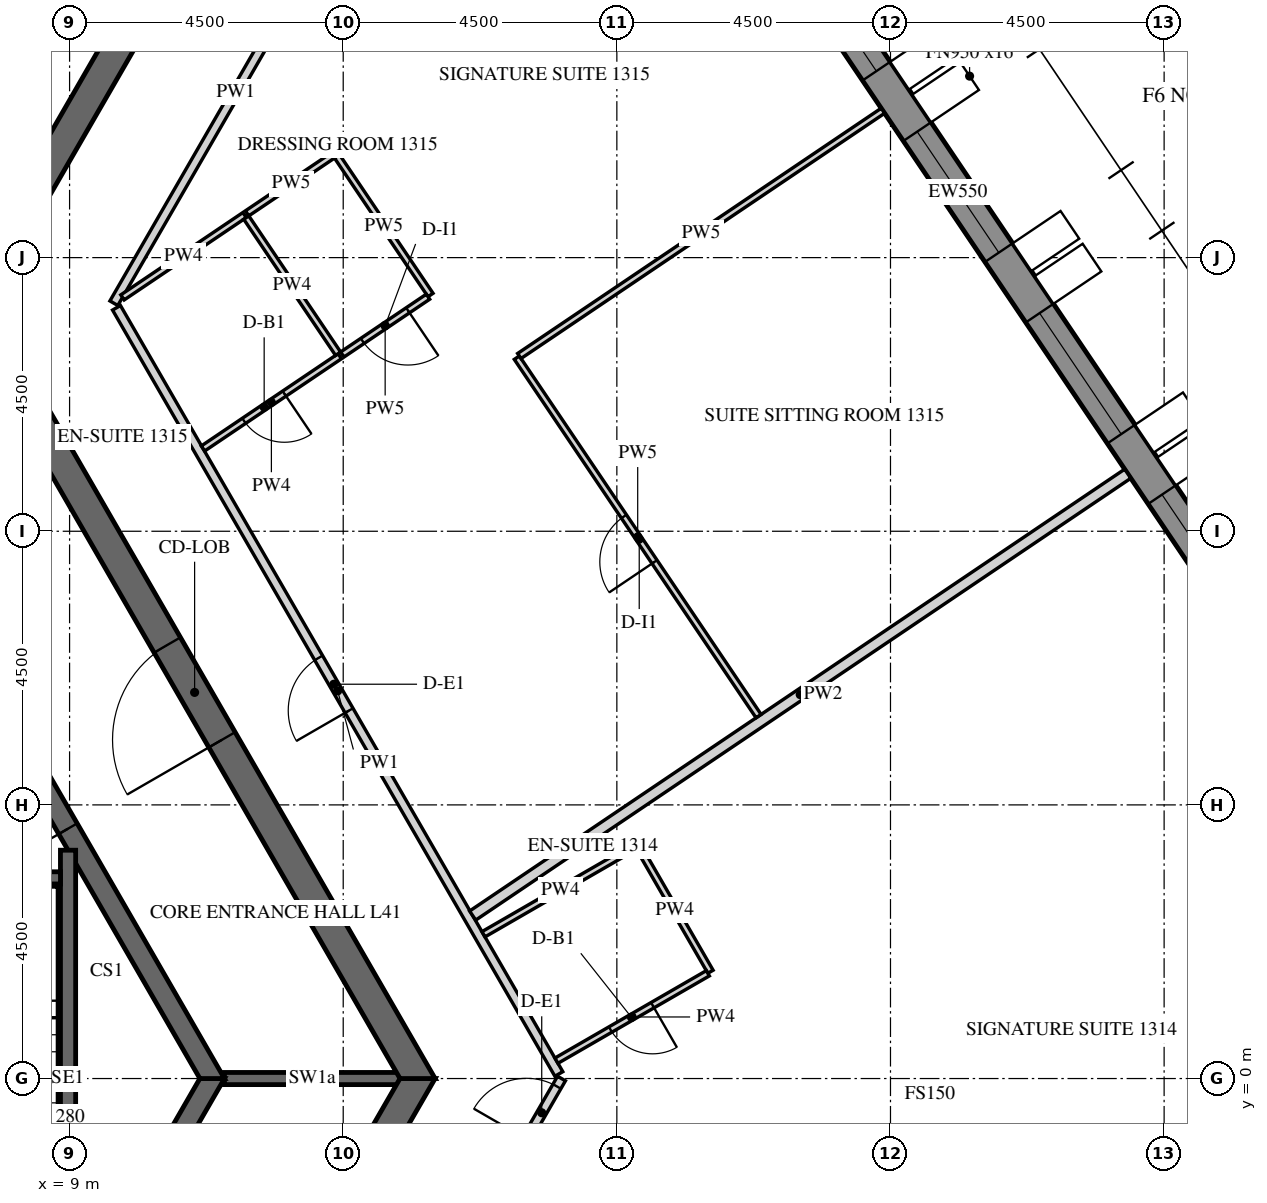
"""IFC4 building model, lengths in metres.
Left out: names, types, materials, properties, quantities, classifications, styles, units other than length and angle.
Written with IfcOpenShell. Run it as: python <this file> out.ifc"""

import sys

from ifc_helpers import new_model, si_unit, direction, frame, frame_2d, origin, place, context, subcontext, project, spatial, polyline, rectangle, outline, extrude, element, fill, save


model = new_model("IFC4")
c1 = context("Model", 3, precision=1e-05, world=origin(), true_north=direction((0.0, 1.0)))
c2 = subcontext(c1, "Body", "Model", "MODEL_VIEW")
j1 = project(units=[si_unit("LENGTHUNIT", "METRE"), si_unit("PLANEANGLEUNIT", "RADIAN")], contexts=[c1])
p1 = place(None, origin())
s1 = spatial("IfcSite", under=j1, at=p1, CompositionType="ELEMENT")
p2 = place(p1, origin())
s2 = spatial("IfcBuilding", under=s1, at=p2, CompositionType="ELEMENT")
p3 = place(p2, frame((0.0, 0.0, 176.1)))
s3 = spatial("IfcBuildingStorey", under=s2, at=p3, CompositionType="ELEMENT", Elevation=176.1)
p4 = place(p3, frame((31.371, 3.071, -0.15), z_axis=(0.0, 0.0, 1.0), x_axis=(-0.559189891278, 0.829039604297, 0.0)))
e1 = element("IfcWall", 1, at=p4, inside=s3, PredefinedType="SOLIDWALL", context=c2, shape_type="SweptSolid", body=[
    extrude(outline(polyline([(-0.026, -0.275), (27.781, -0.275), (27.736, 0.275), (0.026, 0.275), (-0.026, -0.275)])), origin(), (0.0, 0.0, 1.0), 3.9),
])
p5 = place(p4, frame((1.879, 0.0, 1.05)))
e2 = element("IfcOpeningElement", 2, at=p5, cuts=e1, PredefinedType="OPENING", context=c2, shape_type="SweptSolid", body=[
    extrude(rectangle(XDim=2.4, YDim=2.4, at=frame_2d((1.2, 1.2))), frame((0.0, 0.285, 0.0), z_axis=(0.0, -1.0, 0.0), x_axis=(1.0, 0.0, 0.0)), (0.0, 0.0, 1.0), 0.57),
])
p6 = place(p4, frame((5.479, 0.0, 1.05)))
e3 = element("IfcOpeningElement", 3, at=p6, cuts=e1, PredefinedType="OPENING", context=c2, shape_type="SweptSolid", body=[
    extrude(rectangle(XDim=2.4, YDim=2.4, at=frame_2d((1.2, 1.2))), frame((0.0, 0.285, 0.0), z_axis=(0.0, -1.0, 0.0), x_axis=(1.0, 0.0, 0.0)), (0.0, 0.0, 1.0), 0.57),
])
p7 = place(p4, frame((9.079, 0.0, 1.05)))
e4 = element("IfcOpeningElement", 4, at=p7, cuts=e1, PredefinedType="OPENING", context=c2, shape_type="SweptSolid", body=[
    extrude(rectangle(XDim=2.4, YDim=2.4, at=frame_2d((1.2, 1.2))), frame((0.0, 0.285, 0.0), z_axis=(0.0, -1.0, 0.0), x_axis=(1.0, 0.0, 0.0)), (0.0, 0.0, 1.0), 0.57),
])
p8 = place(p4, frame((12.679, 0.0, 1.05)))
e5 = element("IfcOpeningElement", 5, at=p8, cuts=e1, PredefinedType="OPENING", context=c2, shape_type="SweptSolid", body=[
    extrude(rectangle(XDim=2.4, YDim=2.4, at=frame_2d((1.2, 1.2))), frame((0.0, 0.285, 0.0), z_axis=(0.0, -1.0, 0.0), x_axis=(1.0, 0.0, 0.0)), (0.0, 0.0, 1.0), 0.57),
])
p9 = place(p4, frame((16.279, 0.0, 1.05)))
e6 = element("IfcOpeningElement", 6, at=p9, cuts=e1, PredefinedType="OPENING", context=c2, shape_type="SweptSolid", body=[
    extrude(rectangle(XDim=2.4, YDim=2.4, at=frame_2d((1.2, 1.2))), frame((0.0, 0.285, 0.0), z_axis=(0.0, -1.0, 0.0), x_axis=(1.0, 0.0, 0.0)), (0.0, 0.0, 1.0), 0.57),
])
p10 = place(p4, frame((19.879, 0.0, 1.05)))
e7 = element("IfcOpeningElement", 7, at=p10, cuts=e1, PredefinedType="OPENING", context=c2, shape_type="SweptSolid", body=[
    extrude(rectangle(XDim=2.4, YDim=2.4, at=frame_2d((1.2, 1.2))), frame((0.0, 0.285, 0.0), z_axis=(0.0, -1.0, 0.0), x_axis=(1.0, 0.0, 0.0)), (0.0, 0.0, 1.0), 0.57),
])
p11 = place(p4, frame((23.479, 0.0, 1.05)))
e8 = element("IfcOpeningElement", 8, at=p11, cuts=e1, PredefinedType="OPENING", context=c2, shape_type="SweptSolid", body=[
    extrude(rectangle(XDim=2.4, YDim=2.4, at=frame_2d((1.2, 1.2))), frame((0.0, 0.285, 0.0), z_axis=(0.0, -1.0, 0.0), x_axis=(1.0, 0.0, 0.0)), (0.0, 0.0, 1.0), 0.57),
])
p12 = place(p3, frame((7.361, -12.75, -0.15), z_axis=(0.0, 0.0, 1.0), x_axis=(0.50000571537, 0.866022103989, 0.0)))
e9 = element("IfcWall", 9, at=p12, inside=s3, PredefinedType="SHEAR", context=c2, shape_type="SweptSolid", body=[
    extrude(outline(polyline([(-0.144, -0.25), (14.867, -0.25), (14.578, 0.25), (0.144, 0.25), (-0.144, -0.25)])), origin(), (0.0, 0.0, 1.0), 3.9),
])
p13 = place(p12, frame((6.49, 0.0, 0.15)))
e10 = element("IfcOpeningElement", 10, at=p13, cuts=e9, PredefinedType="OPENING", context=c2, shape_type="SweptSolid", body=[
    extrude(rectangle(XDim=1.8, YDim=2.4, at=frame_2d((0.9, 1.2))), frame((0.0, 0.26, 0.0), z_axis=(0.0, -1.0, 0.0), x_axis=(1.0, 0.0, 0.0)), (0.0, 0.0, 1.0), 0.52),
])
p14 = place(p3, frame((14.722, 0.0, -0.15), z_axis=(0.0, 0.0, 1.0), x_axis=(-0.50000571537, 0.866022103989, 0.0)))
e11 = element("IfcWall", 11, at=p14, inside=s3, PredefinedType="SHEAR", context=c2, shape_type="SweptSolid", body=[
    extrude(outline(polyline([(-0.144, -0.25), (14.867, -0.25), (14.578, 0.25), (0.144, 0.25), (-0.144, -0.25)])), origin(), (0.0, 0.0, 1.0), 3.9),
])
p15 = place(p14, frame((6.432, 0.0, 0.15)))
e12 = element("IfcOpeningElement", 12, at=p15, cuts=e11, PredefinedType="OPENING", context=c2, shape_type="SweptSolid", body=[
    extrude(rectangle(XDim=1.8, YDim=2.4, at=frame_2d((0.9, 1.2))), frame((0.0, 0.26, 0.0), z_axis=(0.0, -1.0, 0.0), x_axis=(1.0, 0.0, 0.0)), (0.0, 0.0, 1.0), 0.52),
])
p16 = place(p3, frame((7.506, 13.0, -0.15), z_axis=(0.0, 0.0, 1.0), x_axis=(0.499988271576, 0.866032175087, 0.0)))
e13 = element("IfcWall", 13, at=p16, inside=s3, PredefinedType="SHEAR", context=c2, shape_type="SweptSolid", body=[
    extrude(rectangle(XDim=15.424, YDim=0.5, at=frame_2d((7.712, 0.0))), origin(), (0.0, 0.0, 1.0), 3.9),
])
p17 = place(p16, frame((6.812, 0.0, 0.15)))
e14 = element("IfcOpeningElement", 14, at=p17, cuts=e13, PredefinedType="OPENING", context=c2, shape_type="SweptSolid", body=[
    extrude(rectangle(XDim=1.8, YDim=2.4, at=frame_2d((0.9, 1.2))), frame((0.0, 0.26, 0.0), z_axis=(0.0, -1.0, 0.0), x_axis=(1.0, 0.0, 0.0)), (0.0, 0.0, 1.0), 0.52),
])
p18 = place(p3, frame((5.673, -9.825, -0.15), z_axis=(0.0, 0.0, 1.0), x_axis=(0.499995046907, 0.866028263435, 0.0)))
e15 = element("IfcWall", 15, at=p18, inside=s3, PredefinedType="SHEAR", context=c2, shape_type="SweptSolid", body=[
    extrude(outline(polyline([(-0.101, -0.175), (11.446, -0.175), (11.244, 0.175), (0.101, 0.175), (-0.101, -0.175)])), origin(), (0.0, 0.0, 1.0), 3.9),
])
p19 = place(p18, frame((4.801, 0.0, 0.15)))
e16 = element("IfcOpeningElement", 16, at=p19, cuts=e15, PredefinedType="OPENING", context=c2, shape_type="SweptSolid", body=[
    extrude(rectangle(XDim=1.8, YDim=2.4, at=frame_2d((0.9, 1.2))), frame((0.0, 0.185, 0.0), z_axis=(0.0, -1.0, 0.0), x_axis=(1.0, 0.0, 0.0)), (0.0, 0.0, 1.0), 0.37),
])
p20 = place(p3, frame((11.345, 0.0, -0.15), z_axis=(0.0, 0.0, 1.0), x_axis=(-0.499995046907, 0.866028263435, 0.0)))
e17 = element("IfcWall", 17, at=p20, inside=s3, PredefinedType="SHEAR", context=c2, shape_type="SweptSolid", body=[
    extrude(outline(polyline([(-0.101, -0.175), (11.446, -0.175), (11.244, 0.175), (0.101, 0.175), (-0.101, -0.175)])), origin(), (0.0, 0.0, 1.0), 3.9),
])
p21 = place(p20, frame((4.744, 0.0, 0.15)))
e18 = element("IfcOpeningElement", 18, at=p21, cuts=e17, PredefinedType="OPENING", context=c2, shape_type="SweptSolid", body=[
    extrude(rectangle(XDim=1.8, YDim=2.4, at=frame_2d((0.9, 1.2))), frame((0.0, 0.185, 0.0), z_axis=(0.0, -1.0, 0.0), x_axis=(1.0, 0.0, 0.0)), (0.0, 0.0, 1.0), 0.37),
])
p22 = place(p3, frame((11.547, 0.0, -0.15), z_axis=(0.0, 0.0, 1.0), x_axis=(1.0, 0.0, 0.0)))
e19 = element("IfcWall", 19, at=p22, inside=s3, PredefinedType="SHEAR", context=c2, shape_type="SweptSolid", body=[
    extrude(rectangle(XDim=2.887, YDim=0.2, at=frame_2d((1.443, 0.0))), origin(), (0.0, 0.0, 1.0), 3.9),
])
p23 = place(p3, frame((8.975, -3.755, -0.25), z_axis=(0.0, 0.0, 1.0), x_axis=(0.0, 1.0, 0.0)))
e20 = element("IfcWall", 20, at=p23, inside=s3, PredefinedType="SHEAR", context=c2, shape_type="SweptSolid", body=[
    extrude(rectangle(XDim=7.51, YDim=0.25, at=frame_2d((3.755, 0.0))), origin(), (0.0, 0.0, 1.0), 3.9),
])
p24 = place(p3, frame((5.9, 3.3, -0.25), z_axis=(0.0, 0.0, 1.0), x_axis=(1.0, 0.0, 0.0)))
e21 = element("IfcWall", 21, at=p24, inside=s3, PredefinedType="SHEAR", context=c2, shape_type="SweptSolid", body=[
    extrude(rectangle(XDim=2.95, YDim=0.2, at=frame_2d((1.475, 0.0))), origin(), (0.0, 0.0, 1.0), 3.9),
])
p25 = place(p3, frame((10.149, 21.678, 0.0), z_axis=(0.0, 0.0, 1.0), x_axis=(-0.499997422768, -0.866026891745, 0.0)))
e22 = element("IfcWall", 22, at=p25, inside=s3, PredefinedType="PARTITIONING", context=c2, shape_type="SweptSolid", body=[
    extrude(rectangle(XDim=7.942, YDim=0.15, at=frame_2d((3.971, 0.0))), origin(), (0.0, 0.0, 1.0), 2.988),
])
p26 = place(p25, frame((4.733, 0.0, 0.0)))
e23 = element("IfcOpeningElement", 23, at=p26, cuts=e22, PredefinedType="OPENING", context=c2, shape_type="SweptSolid", body=[
    extrude(rectangle(XDim=1.0, YDim=2.1, at=frame_2d((0.5, 1.05))), frame((0.0, 0.085, 0.0), z_axis=(0.0, -1.0, 0.0), x_axis=(1.0, 0.0, 0.0)), (0.0, 0.0, 1.0), 0.17),
])
p27 = place(p3, frame((10.714, -11.043, 0.0), z_axis=(0.0, 0.0, 1.0), x_axis=(0.500001980452, 0.866024260367, 0.0)))
e24 = element("IfcWall", 24, at=p27, inside=s3, PredefinedType="PARTITIONING", context=c2, shape_type="SweptSolid", body=[
    extrude(rectangle(XDim=12.752, YDim=0.15, at=frame_2d((6.376, 0.0))), origin(), (0.0, 0.0, 1.0), 2.988),
])
p28 = place(p27, frame((6.125, 0.0, 0.0)))
e25 = element("IfcOpeningElement", 25, at=p28, cuts=e24, PredefinedType="OPENING", context=c2, shape_type="SweptSolid", body=[
    extrude(rectangle(XDim=1.0, YDim=2.1, at=frame_2d((0.5, 1.05))), frame((0.0, 0.085, 0.0), z_axis=(0.0, -1.0, 0.0), x_axis=(1.0, 0.0, 0.0)), (0.0, 0.0, 1.0), 0.17),
])
p29 = place(p27, frame((11.602, 0.0, 0.0)))
e26 = element("IfcOpeningElement", 26, at=p29, cuts=e24, PredefinedType="OPENING", context=c2, shape_type="SweptSolid", body=[
    extrude(rectangle(XDim=1.0, YDim=2.1, at=frame_2d((0.5, 1.05))), frame((0.0, 0.085, 0.0), z_axis=(0.0, -1.0, 0.0), x_axis=(1.0, 0.0, 0.0)), (0.0, 0.0, 1.0), 0.17),
])
p30 = place(p3, frame((17.046, 0.075, 0.0), z_axis=(0.0, 0.0, 1.0), x_axis=(-0.499999403554, 0.866025748143, 0.0)))
e27 = element("IfcWall", 27, at=p30, inside=s3, PredefinedType="PARTITIONING", context=c2, shape_type="SweptSolid", body=[
    extrude(rectangle(XDim=14.549, YDim=0.15, at=frame_2d((7.275, 0.0))), origin(), (0.0, 0.0, 1.0), 2.988),
])
p31 = place(p30, frame((6.901, 0.0, 0.0)))
e28 = element("IfcOpeningElement", 28, at=p31, cuts=e27, PredefinedType="OPENING", context=c2, shape_type="SweptSolid", body=[
    extrude(rectangle(XDim=1.0, YDim=2.1, at=frame_2d((0.5, 1.05))), frame((0.0, 0.085, 0.0), z_axis=(0.0, -1.0, 0.0), x_axis=(1.0, 0.0, 0.0)), (0.0, 0.0, 1.0), 0.17),
])
p32 = place(p3, frame((9.728, 12.75, 0.0), z_axis=(0.0, 0.0, 1.0), x_axis=(0.500007149838, 0.866021275784, 0.0)))
e29 = element("IfcWall", 29, at=p32, inside=s3, PredefinedType="PARTITIONING", context=c2, shape_type="SweptSolid", body=[
    extrude(rectangle(XDim=8.017, YDim=0.15, at=frame_2d((4.009, 0.0))), origin(), (0.0, 0.0, 1.0), 2.988),
])
p33 = place(p3, frame((15.807, 2.372, 0.0), z_axis=(0.0, 0.0, 1.0), x_axis=(0.86601045545, 0.500025890382, 0.0)))
e30 = element("IfcWall", 30, at=p33, inside=s3, PredefinedType="PARTITIONING", context=c2, shape_type="SweptSolid", body=[
    extrude(rectangle(XDim=2.925, YDim=0.1, at=frame_2d((1.462, 0.0))), origin(), (0.0, 0.0, 1.0), 2.988),
])
p34 = place(p3, frame((18.365, 3.791, 0.0), z_axis=(0.0, 0.0, 1.0), x_axis=(0.500016218704, -0.866016039709, 0.0)))
e31 = element("IfcWall", 31, at=p34, inside=s3, PredefinedType="PARTITIONING", context=c2, shape_type="SweptSolid", body=[
    extrude(rectangle(XDim=2.35, YDim=0.1, at=frame_2d((1.175, 0.0))), origin(), (0.0, 0.0, 1.0), 2.988),
])
p35 = place(p3, frame((19.496, 1.731, 0.0), z_axis=(0.0, 0.0, 1.0), x_axis=(-0.866018712932, -0.500011588718, 0.0)))
e32 = element("IfcWall", 32, at=p35, inside=s3, PredefinedType="PARTITIONING", context=c2, shape_type="SweptSolid", body=[
    extrude(rectangle(XDim=2.875, YDim=0.1, at=frame_2d((1.438, 0.0))), origin(), (0.0, 0.0, 1.0), 2.988),
])
p36 = place(p35, frame((1.05, 0.0, 0.0)))
e33 = element("IfcOpeningElement", 33, at=p36, cuts=e32, PredefinedType="OPENING", context=c2, shape_type="SweptSolid", body=[
    extrude(rectangle(XDim=0.8, YDim=2.1, at=frame_2d((0.4, 1.05))), frame((0.0, 0.06, 0.0), z_axis=(0.0, -1.0, 0.0), x_axis=(1.0, 0.0, 0.0)), (0.0, 0.0, 1.0), 0.12),
])
p37 = place(p3, frame((26.402, 9.946, 0.0), z_axis=(0.0, 0.0, 1.0), x_axis=(-0.829032022697, -0.559201131386, 0.0)))
e34 = element("IfcWall", 34, at=p37, inside=s3, PredefinedType="PARTITIONING", context=c2, shape_type="SweptSolid", body=[
    extrude(rectangle(XDim=12.995, YDim=0.18, at=frame_2d((6.497, 0.0))), origin(), (0.0, 0.0, 1.0), 2.988),
])
p38 = place(p3, frame((9.87, 12.846, 0.0), z_axis=(0.0, 0.0, 1.0), x_axis=(0.829044958406, 0.559181953341, 0.0)))
e35 = element("IfcWall", 35, at=p38, inside=s3, PredefinedType="PARTITIONING", context=c2, shape_type="SweptSolid", body=[
    extrude(rectangle(XDim=2.422, YDim=0.1, at=frame_2d((1.211, 0.0))), origin(), (0.0, 0.0, 1.0), 2.988),
])
p39 = place(p3, frame((13.444, 11.878, 0.0), z_axis=(0.0, 0.0, 1.0), x_axis=(-0.829076008986, -0.559135914894, 0.0)))
e36 = element("IfcWall", 36, at=p39, inside=s3, PredefinedType="PARTITIONING", context=c2, shape_type="SweptSolid", body=[
    extrude(rectangle(XDim=2.713, YDim=0.1, at=frame_2d((1.357, 0.0))), origin(), (0.0, 0.0, 1.0), 2.988),
])
p40 = place(p39, frame((1.1, 0.0, 0.0)))
e37 = element("IfcOpeningElement", 37, at=p40, cuts=e36, PredefinedType="OPENING", context=c2, shape_type="SweptSolid", body=[
    extrude(rectangle(XDim=0.8, YDim=2.1, at=frame_2d((0.4, 1.05))), frame((0.0, 0.06, 0.0), z_axis=(0.0, -1.0, 0.0), x_axis=(1.0, 0.0, 0.0)), (0.0, 0.0, 1.0), 0.12),
])
p41 = place(p3, frame((11.919, 14.228, 0.0), z_axis=(0.0, 0.0, 1.0), x_axis=(0.829076640662, 0.559134978256, 0.0)))
e38 = element("IfcWall", 38, at=p41, inside=s3, PredefinedType="PARTITIONING", context=c2, shape_type="SweptSolid", body=[
    extrude(rectangle(XDim=1.75, YDim=0.1, at=frame_2d((0.875, 0.0))), origin(), (0.0, 0.0, 1.0), 2.988),
])
p42 = place(p3, frame((13.398, 15.165, 0.0), z_axis=(0.0, 0.0, 1.0), x_axis=(0.559178562802, -0.829047245278, 0.0)))
e39 = element("IfcWall", 39, at=p42, inside=s3, PredefinedType="PARTITIONING", context=c2, shape_type="SweptSolid", body=[
    extrude(rectangle(XDim=2.75, YDim=0.1, at=frame_2d((1.375, 0.0))), origin(), (0.0, 0.0, 1.0), 2.988),
])
p43 = place(p3, frame((14.894, 12.857, 0.0), z_axis=(0.0, 0.0, 1.0), x_axis=(-0.828988508894, -0.559265636457, 0.0)))
e40 = element("IfcWall", 40, at=p43, inside=s3, PredefinedType="PARTITIONING", context=c2, shape_type="SweptSolid", body=[
    extrude(rectangle(XDim=1.7, YDim=0.1, at=frame_2d((0.85, 0.0))), origin(), (0.0, 0.0, 1.0), 2.988),
])
p44 = place(p43, frame((0.4, 0.0, 0.0)))
e41 = element("IfcOpeningElement", 41, at=p44, cuts=e40, PredefinedType="OPENING", context=c2, shape_type="SweptSolid", body=[
    extrude(rectangle(XDim=0.9, YDim=2.1, at=frame_2d((0.45, 1.05))), frame((0.0, 0.06, 0.0), z_axis=(0.0, -1.0, 0.0), x_axis=(1.0, 0.0, 0.0)), (0.0, 0.0, 1.0), 0.12),
])
p45 = place(p3, frame((20.331, 5.96, 0.0), z_axis=(0.0, 0.0, 1.0), x_axis=(-0.559185029686, 0.829042883435, 0.0)))
e42 = element("IfcWall", 42, at=p45, inside=s3, PredefinedType="PARTITIONING", context=c2, shape_type="SweptSolid", body=[
    extrude(rectangle(XDim=7.11, YDim=0.1, at=frame_2d((3.555, 0.0))), origin(), (0.0, 0.0, 1.0), 2.988),
])
p46 = place(p45, frame((3.06, 0.0, 0.0)))
e43 = element("IfcOpeningElement", 43, at=p46, cuts=e42, PredefinedType="OPENING", context=c2, shape_type="SweptSolid", body=[
    extrude(rectangle(XDim=0.9, YDim=2.1, at=frame_2d((0.45, 1.05))), frame((0.0, 0.06, 0.0), z_axis=(0.0, -1.0, 0.0), x_axis=(1.0, 0.0, 0.0)), (0.0, 0.0, 1.0), 0.12),
])
p47 = place(p3, frame((16.396, 11.882, 0.0), z_axis=(0.0, 0.0, 1.0), x_axis=(0.829038554805, 0.559191447223, 0.0)))
e44 = element("IfcWall", 44, at=p47, inside=s3, PredefinedType="PARTITIONING", context=c2, shape_type="SweptSolid", body=[
    extrude(rectangle(XDim=7.213, YDim=0.1, at=frame_2d((3.606, 0.0))), origin(), (0.0, 0.0, 1.0), 2.988),
])
p48 = place(p3, frame((13.416, 11.92, 0.0), z_axis=(0.0, 0.0, 1.0), x_axis=(-0.559157567313, 0.829061405999, 0.0)))
e45 = element("IfcWall", 45, at=p48, inside=s3, PredefinedType="PARTITIONING", context=c2, shape_type="SweptSolid", body=[
    extrude(rectangle(XDim=2.7, YDim=0.1, at=frame_2d((1.35, 0.0))), origin(), (0.0, 0.0, 1.0), 2.988),
])
p49 = place(p6, frame((0.0, 0.205, 0.0)))
e46 = element("IfcWindow", 46, at=p49, inside=s3, PartitioningType="DOUBLE_PANEL_VERTICAL", PredefinedType="WINDOW", context=c2, shape_type="SweptSolid", body=[
    extrude(rectangle(XDim=2.4, YDim=2.4, at=frame_2d((1.2, 1.2))), frame((0.0, 0.03, 0.0), z_axis=(0.0, -1.0, 0.0), x_axis=(1.0, 0.0, 0.0)), (0.0, 0.0, 1.0), 0.06),
])
fill(e3, e46)
p50 = place(p7, frame((0.0, 0.205, 0.0)))
e47 = element("IfcWindow", 47, at=p50, inside=s3, PartitioningType="DOUBLE_PANEL_VERTICAL", PredefinedType="WINDOW", context=c2, shape_type="SweptSolid", body=[
    extrude(rectangle(XDim=2.4, YDim=2.4, at=frame_2d((1.2, 1.2))), frame((0.0, 0.03, 0.0), z_axis=(0.0, -1.0, 0.0), x_axis=(1.0, 0.0, 0.0)), (0.0, 0.0, 1.0), 0.06),
])
fill(e4, e47)
p51 = place(p8, frame((0.0, 0.205, 0.0)))
e48 = element("IfcWindow", 48, at=p51, inside=s3, PartitioningType="DOUBLE_PANEL_VERTICAL", PredefinedType="WINDOW", context=c2, shape_type="SweptSolid", body=[
    extrude(rectangle(XDim=2.4, YDim=2.4, at=frame_2d((1.2, 1.2))), frame((0.0, 0.03, 0.0), z_axis=(0.0, -1.0, 0.0), x_axis=(1.0, 0.0, 0.0)), (0.0, 0.0, 1.0), 0.06),
])
fill(e5, e48)
p52 = place(p9, frame((0.0, 0.205, 0.0)))
e49 = element("IfcWindow", 49, at=p52, inside=s3, PartitioningType="DOUBLE_PANEL_VERTICAL", PredefinedType="WINDOW", context=c2, shape_type="SweptSolid", body=[
    extrude(rectangle(XDim=2.4, YDim=2.4, at=frame_2d((1.2, 1.2))), frame((0.0, 0.03, 0.0), z_axis=(0.0, -1.0, 0.0), x_axis=(1.0, 0.0, 0.0)), (0.0, 0.0, 1.0), 0.06),
])
fill(e6, e49)
p53 = place(p15, origin())
e50 = element("IfcDoor", 50, at=p53, inside=s3, OperationType="DOUBLE_DOOR_SINGLE_SWING", PredefinedType="DOOR", context=c2, shape_type="SweptSolid", body=[
    extrude(rectangle(XDim=1.8, YDim=2.4, at=frame_2d((0.9, 1.2))), frame((0.0, 0.025, 0.0), z_axis=(0.0, -1.0, 0.0), x_axis=(1.0, 0.0, 0.0)), (0.0, 0.0, 1.0), 0.05),
])
fill(e12, e50)
p54 = place(p21, origin())
e51 = element("IfcDoor", 51, at=p54, inside=s3, OperationType="DOUBLE_DOOR_SINGLE_SWING", PredefinedType="DOOR", context=c2, shape_type="SweptSolid", body=[
    extrude(rectangle(XDim=1.8, YDim=2.4, at=frame_2d((0.9, 1.2))), frame((0.0, 0.025, 0.0), z_axis=(0.0, -1.0, 0.0), x_axis=(1.0, 0.0, 0.0)), (0.0, 0.0, 1.0), 0.05),
])
fill(e18, e51)
p55 = place(p29, origin())
e52 = element("IfcDoor", 52, at=p55, inside=s3, OperationType="SINGLE_SWING_LEFT", PredefinedType="DOOR", context=c2, shape_type="SweptSolid", body=[
    extrude(rectangle(XDim=1.0, YDim=2.1, at=frame_2d((0.5, 1.05))), frame((0.0, 0.025, 0.0), z_axis=(0.0, -1.0, 0.0), x_axis=(1.0, 0.0, 0.0)), (0.0, 0.0, 1.0), 0.05),
])
fill(e26, e52)
p56 = place(p36, origin())
e53 = element("IfcDoor", 53, at=p56, inside=s3, OperationType="SINGLE_SWING_LEFT", PredefinedType="DOOR", context=c2, shape_type="SweptSolid", body=[
    extrude(rectangle(XDim=0.8, YDim=2.1, at=frame_2d((0.4, 1.05))), frame((0.0, 0.025, 0.0), z_axis=(0.0, -1.0, 0.0), x_axis=(1.0, 0.0, 0.0)), (0.0, 0.0, 1.0), 0.05),
])
fill(e33, e53)
p57 = place(p31, origin())
e54 = element("IfcDoor", 54, at=p57, inside=s3, OperationType="SINGLE_SWING_RIGHT", PredefinedType="DOOR", context=c2, shape_type="SweptSolid", body=[
    extrude(rectangle(XDim=1.0, YDim=2.1, at=frame_2d((0.5, 1.05))), frame((0.0, 0.025, 0.0), z_axis=(0.0, -1.0, 0.0), x_axis=(1.0, 0.0, 0.0)), (0.0, 0.0, 1.0), 0.05),
])
fill(e28, e54)
p58 = place(p40, origin())
e55 = element("IfcDoor", 55, at=p58, inside=s3, OperationType="SINGLE_SWING_LEFT", PredefinedType="DOOR", context=c2, shape_type="SweptSolid", body=[
    extrude(rectangle(XDim=0.8, YDim=2.1, at=frame_2d((0.4, 1.05))), frame((0.0, 0.025, 0.0), z_axis=(0.0, -1.0, 0.0), x_axis=(1.0, 0.0, 0.0)), (0.0, 0.0, 1.0), 0.05),
])
fill(e37, e55)
p59 = place(p44, origin())
e56 = element("IfcDoor", 56, at=p59, inside=s3, OperationType="SINGLE_SWING_RIGHT", PredefinedType="DOOR", context=c2, shape_type="SweptSolid", body=[
    extrude(rectangle(XDim=0.9, YDim=2.1, at=frame_2d((0.45, 1.05))), frame((0.0, 0.025, 0.0), z_axis=(0.0, -1.0, 0.0), x_axis=(1.0, 0.0, 0.0)), (0.0, 0.0, 1.0), 0.05),
])
fill(e41, e56)
p60 = place(p46, origin())
e57 = element("IfcDoor", 57, at=p60, inside=s3, OperationType="SINGLE_SWING_RIGHT", PredefinedType="DOOR", context=c2, shape_type="SweptSolid", body=[
    extrude(rectangle(XDim=0.9, YDim=2.1, at=frame_2d((0.45, 1.05))), frame((0.0, 0.025, 0.0), z_axis=(0.0, -1.0, 0.0), x_axis=(1.0, 0.0, 0.0)), (0.0, 0.0, 1.0), 0.05),
])
fill(e43, e57)
save(model, sys.argv[1])
